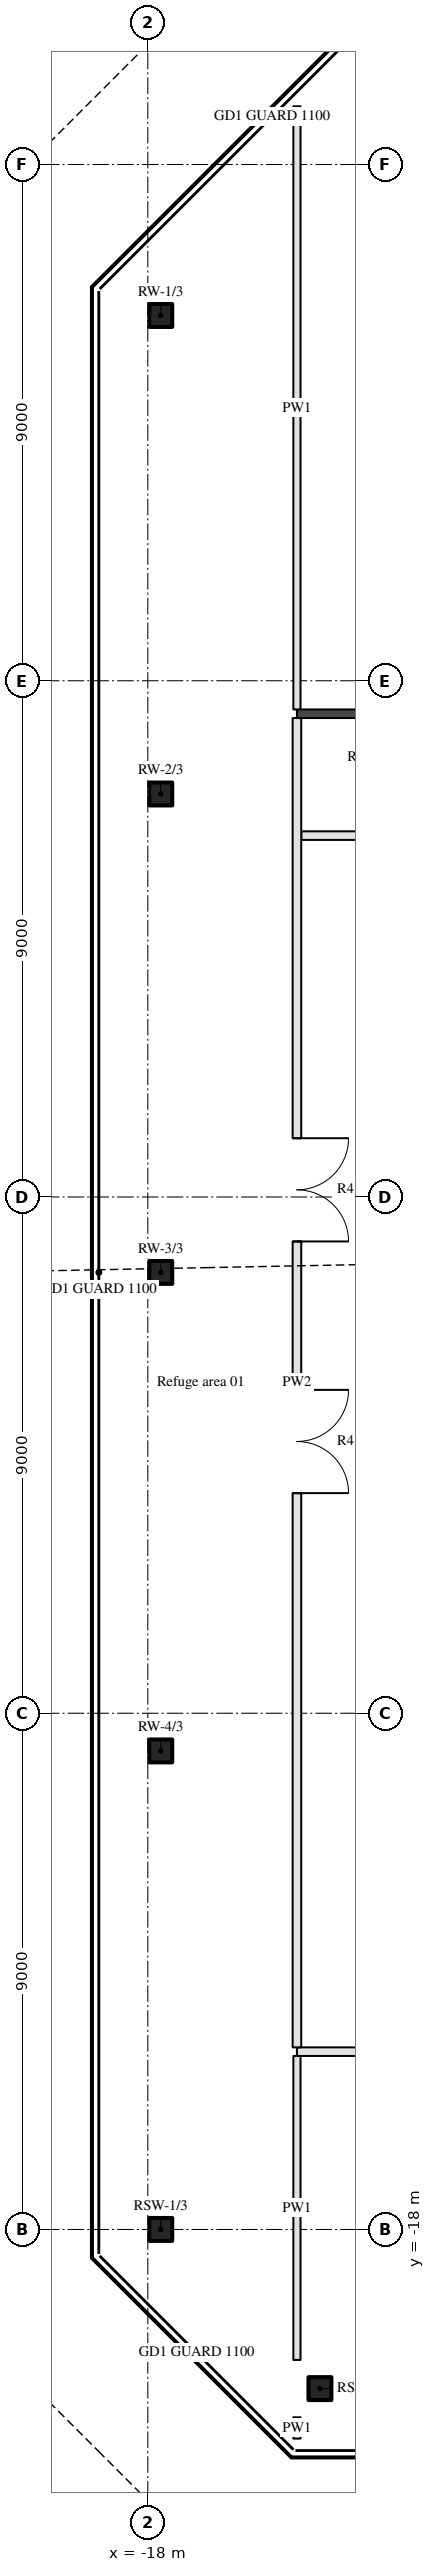
"""IFC4 building model, lengths in metres.
Left out: names, types, materials, properties, quantities, classifications, styles, units other than length and angle.
Written with IfcOpenShell. Run it as: python <this file> out.ifc"""

import sys

from ifc_helpers import new_model, si_unit, direction, frame, frame_2d, origin, origin_2d, place, context, subcontext, project, spatial, rectangle, hollow_rectangle, extrude, element, fill, save


model = new_model("IFC4")
c1 = context("Model", 3, precision=1e-05, world=origin(), true_north=direction((0.0, 1.0)))
c2 = subcontext(c1, "Body", "Model", "MODEL_VIEW")
j1 = project(units=[si_unit("LENGTHUNIT", "METRE"), si_unit("PLANEANGLEUNIT", "RADIAN")], contexts=[c1])
p1 = place(None, origin())
s1 = spatial("IfcSite", under=j1, at=p1, CompositionType="ELEMENT")
p2 = place(p1, origin())
s2 = spatial("IfcBuilding", under=s1, at=p2, CompositionType="ELEMENT")
p3 = place(p2, frame((0.0, 0.0, 167.7)))
s3 = spatial("IfcBuildingStorey", under=s2, at=p3, CompositionType="ELEMENT", Elevation=167.7)
for number, where, z_axis, x_axis in (
    (1, (-14.999, -20.774, 0.0), (0.0, 0.0, 1.0), (1.0, 0.0, 0.0)),
    (2, (-17.774, 15.368, 0.0), (0.0, 0.0, 1.0), (1.0, 0.0, 0.0)),
    (3, (-17.774, 7.026, 0.0), (0.0, 0.0, 1.0), (1.0, 0.0, 0.0)),
    (4, (-17.774, -1.315, 0.0), (0.0, 0.0, 1.0), (1.0, 0.0, 0.0)),
    (5, (-17.774, -9.657, 0.0), (0.0, 0.0, 1.0), (1.0, 0.0, 0.0)),
    (6, (-17.774, -17.999, 0.0), (0.0, 0.0, 1.0), (1.0, 0.0, 0.0)),
):
    element("IfcColumn", number, at=place(p3, frame(where, z_axis=z_axis, x_axis=x_axis)), inside=s3, PredefinedType="COLUMN", context=c2, shape_type="SweptSolid", body=[
        extrude(hollow_rectangle(XDim=0.4, YDim=0.4, WallThickness=0.02, InnerFilletRadius=0.03, OuterFilletRadius=0.05, at=origin_2d()), origin(), (0.0, 0.0, 1.0), 4.08),
    ])
p4 = place(p3, frame((-15.4, -14.9, 0.0), z_axis=(0.0, 0.0, 1.0), x_axis=(1.0, 0.0, 0.0)))
e7 = element("IfcWall", 7, at=p4, inside=s3, PredefinedType="PARTITIONING", context=c2, shape_type="SweptSolid", body=[
    extrude(rectangle(XDim=30.8, YDim=0.15, at=frame_2d((15.4, 0.0))), origin(), (0.0, 0.0, 1.0), 3.56),
])
p5 = place(p4, frame((14.5, 0.0, 0.0)))
e8 = element("IfcOpeningElement", 8, at=p5, cuts=e7, PredefinedType="OPENING", context=c2, shape_type="SweptSolid", body=[
    extrude(rectangle(XDim=1.8, YDim=2.1, at=frame_2d((0.9, 1.05))), frame((0.0, 0.085, 0.0), z_axis=(0.0, -1.0, 0.0), x_axis=(1.0, 0.0, 0.0)), (0.0, 0.0, 1.0), 0.17),
])
p6 = place(p4, frame((16.6, 0.0, 0.0)))
e9 = element("IfcOpeningElement", 9, at=p6, cuts=e7, PredefinedType="OPENING", context=c2, shape_type="SweptSolid", body=[
    extrude(rectangle(XDim=1.8, YDim=2.1, at=frame_2d((0.9, 1.05))), frame((0.0, 0.085, 0.0), z_axis=(0.0, -1.0, 0.0), x_axis=(1.0, 0.0, 0.0)), (0.0, 0.0, 1.0), 0.17),
])
p7 = place(p3, frame((-15.325, 6.3, 0.0), z_axis=(0.0, 0.0, 1.0), x_axis=(1.0, 0.0, 0.0)))
e10 = element("IfcWall", 10, at=p7, inside=s3, PredefinedType="PARTITIONING", context=c2, shape_type="SweptSolid", body=[
    extrude(rectangle(XDim=7.975, YDim=0.15, at=frame_2d((3.987, 0.0))), origin(), (0.0, 0.0, 1.0), 3.56),
])
p8 = place(p7, frame((1.55, 0.0, 0.0)))
e11 = element("IfcOpeningElement", 11, at=p8, cuts=e10, PredefinedType="OPENING", context=c2, shape_type="SweptSolid", body=[
    extrude(rectangle(XDim=0.9, YDim=2.1, at=frame_2d((0.45, 1.05))), frame((0.0, 0.085, 0.0), z_axis=(0.0, -1.0, 0.0), x_axis=(1.0, 0.0, 0.0)), (0.0, 0.0, 1.0), 0.17),
])
p9 = place(p7, frame((5.538, 0.0, 0.0)))
e12 = element("IfcOpeningElement", 12, at=p9, cuts=e10, PredefinedType="OPENING", context=c2, shape_type="SweptSolid", body=[
    extrude(rectangle(XDim=0.9, YDim=2.1, at=frame_2d((0.45, 1.05))), frame((0.0, 0.085, 0.0), z_axis=(0.0, -1.0, 0.0), x_axis=(1.0, 0.0, 0.0)), (0.0, 0.0, 1.0), 0.17),
])
p10 = place(p3, frame((-15.4, 8.425, 0.0), z_axis=(0.0, 0.0, 1.0), x_axis=(1.0, 0.0, 0.0)))
e13 = element("IfcWall", 13, at=p10, inside=s3, PredefinedType="PARTITIONING", context=c2, shape_type="SweptSolid", body=[
    extrude(rectangle(XDim=8.15, YDim=0.15, at=frame_2d((4.075, 0.0))), origin(), (0.0, 0.0, 1.0), 3.08),
])
p11 = place(p3, frame((-15.4, -21.646, 0.0), z_axis=(0.0, 0.0, 1.0), x_axis=(0.0, 1.0, 0.0)))
e14 = element("IfcWall", 14, at=p11, inside=s3, PredefinedType="PARTITIONING", context=c2, shape_type="SweptSolid", body=[
    extrude(rectangle(XDim=0.372, YDim=0.125, at=frame_2d((0.186, 0.0))), origin(), (0.0, 0.0, 1.0), 3.56),
])
p12 = place(p3, frame((-15.4, -20.274, 0.0), z_axis=(0.0, 0.0, 1.0), x_axis=(0.0, 1.0, 0.0)))
e15 = element("IfcWall", 15, at=p12, inside=s3, PredefinedType="PARTITIONING", context=c2, shape_type="SweptSolid", body=[
    extrude(rectangle(XDim=5.299, YDim=0.125, at=frame_2d((2.649, 0.0))), origin(), (0.0, 0.0, 1.0), 3.56),
])
p13 = place(p3, frame((-15.4, 8.35, 0.0), z_axis=(0.0, 0.0, 1.0), x_axis=(0.0, -1.0, 0.0)))
e16 = element("IfcWall", 16, at=p13, inside=s3, PredefinedType="PARTITIONING", context=c2, shape_type="SweptSolid", body=[
    extrude(rectangle(XDim=23.175, YDim=0.15, at=frame_2d((11.587, 0.0))), origin(), (0.0, 0.0, 1.0), 3.56),
])
p14 = place(p13, frame((11.712, 0.0, 0.0)))
e17 = element("IfcOpeningElement", 17, at=p14, cuts=e16, PredefinedType="OPENING", context=c2, shape_type="SweptSolid", body=[
    extrude(rectangle(XDim=1.8, YDim=2.1, at=frame_2d((0.9, 1.05))), frame((0.0, 0.085, 0.0), z_axis=(0.0, -1.0, 0.0), x_axis=(1.0, 0.0, 0.0)), (0.0, 0.0, 1.0), 0.17),
])
p15 = place(p13, frame((7.325, 0.0, 0.0)))
e18 = element("IfcOpeningElement", 18, at=p15, cuts=e16, PredefinedType="OPENING", context=c2, shape_type="SweptSolid", body=[
    extrude(rectangle(XDim=1.8, YDim=2.1, at=frame_2d((0.9, 1.05))), frame((0.0, 0.085, 0.0), z_axis=(0.0, -1.0, 0.0), x_axis=(1.0, 0.0, 0.0)), (0.0, 0.0, 1.0), 0.17),
])
p16 = place(p3, frame((-15.4, 8.5, 0.0), z_axis=(0.0, 0.0, 1.0), x_axis=(0.0, 1.0, 0.0)))
e19 = element("IfcWall", 19, at=p16, inside=s3, PredefinedType="PARTITIONING", context=c2, shape_type="SweptSolid", body=[
    extrude(rectangle(XDim=10.515, YDim=0.125, at=frame_2d((5.257, 0.0))), origin(), (0.0, 0.0, 1.0), 3.56),
])
p17 = place(p14, origin())
e20 = element("IfcDoor", 20, at=p17, inside=s3, OperationType="DOUBLE_DOOR_SINGLE_SWING", PredefinedType="DOOR", context=c2, shape_type="SweptSolid", body=[
    extrude(rectangle(XDim=1.8, YDim=2.1, at=frame_2d((0.9, 1.05))), frame((0.0, 0.025, 0.0), z_axis=(0.0, -1.0, 0.0), x_axis=(1.0, 0.0, 0.0)), (0.0, 0.0, 1.0), 0.05),
])
fill(e17, e20)
p18 = place(p15, origin())
e21 = element("IfcDoor", 21, at=p18, inside=s3, OperationType="DOUBLE_DOOR_SINGLE_SWING", PredefinedType="DOOR", context=c2, shape_type="SweptSolid", body=[
    extrude(rectangle(XDim=1.8, YDim=2.1, at=frame_2d((0.9, 1.05))), frame((0.0, 0.025, 0.0), z_axis=(0.0, -1.0, 0.0), x_axis=(1.0, 0.0, 0.0)), (0.0, 0.0, 1.0), 0.05),
])
fill(e18, e21)
save(model, sys.argv[1])
